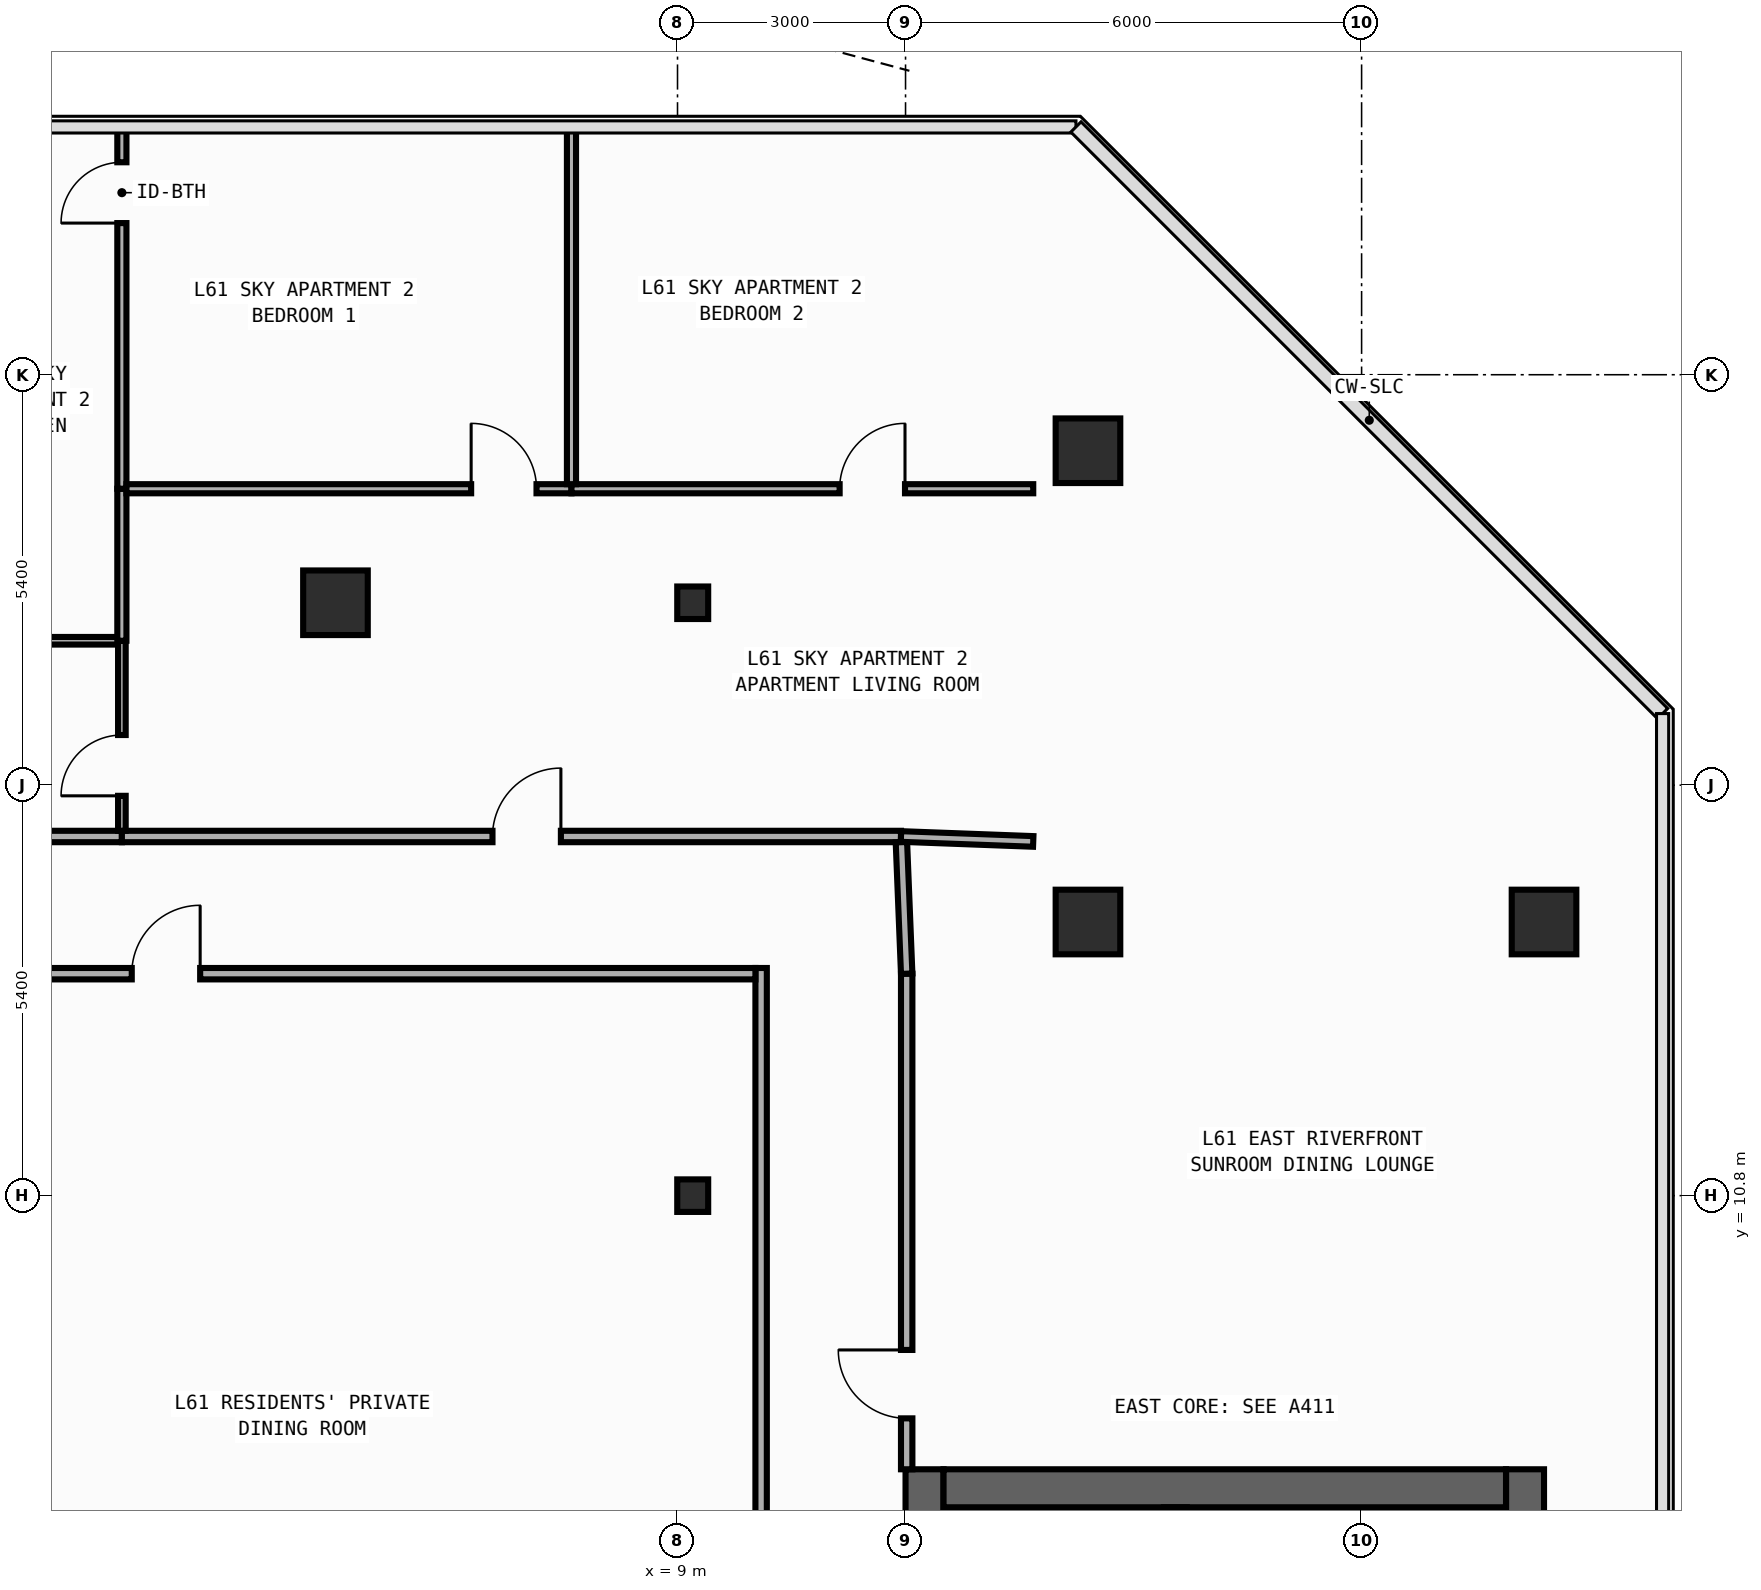
"""IFC4 building model, lengths in metres.
Left out: names, types, materials, properties, quantities, classifications, styles, units other than length and angle.
Written with IfcOpenShell. Run it as: python <this file> out.ifc"""

import sys

from ifc_helpers import new_model, si_unit, direction, frame, frame_2d, origin, origin_2d, place, context, subcontext, project, spatial, rectangle, i_section, extrude, element, fill, save


model = new_model("IFC4")
c1 = context("Model", 3, precision=1e-05, world=origin(), true_north=direction((0.0, 1.0)))
c2 = subcontext(c1, "Body", "Model", "MODEL_VIEW")
j1 = project(units=[si_unit("LENGTHUNIT", "METRE"), si_unit("PLANEANGLEUNIT", "RADIAN")], contexts=[c1])
p1 = place(None, origin())
s1 = spatial("IfcSite", under=j1, at=p1, CompositionType="ELEMENT")
p2 = place(p1, origin())
s2 = spatial("IfcBuilding", under=s1, at=p2, CompositionType="ELEMENT")
p3 = place(p2, frame((0.0, 0.0, 258.4)))
s3 = spatial("IfcBuildingStorey", under=s2, at=p3, CompositionType="ELEMENT", Elevation=258.4)
p4 = place(p3, frame((12.25, -19.8, 0.0), z_axis=(0.0, 0.0, 1.0), x_axis=(0.0, 1.0, 0.0)))
e1 = element("IfcWall", 1, at=p4, inside=s3, PredefinedType="SHEAR", context=c2, shape_type="SweptSolid", body=[
    extrude(rectangle(XDim=27.0, YDim=0.5, at=frame_2d((13.5, 0.0))), origin(), (0.0, 0.0, 1.0), 3.34),
])
p5 = place(p4, frame((23.05, 0.0, 0.0)))
e2 = element("IfcOpeningElement", 2, at=p5, cuts=e1, PredefinedType="OPENING", context=c2, shape_type="SweptSolid", body=[
    extrude(rectangle(XDim=1.1, YDim=2.2, at=frame_2d((0.55, 1.1))), frame((0.0, 0.26, 0.0), z_axis=(0.0, -1.0, 0.0), x_axis=(1.0, 0.0, 0.0)), (0.0, 0.0, 1.0), 0.52),
])
p6 = place(p4, frame((19.85, 0.0, 0.0)))
e3 = element("IfcOpeningElement", 3, at=p6, cuts=e1, PredefinedType="OPENING", context=c2, shape_type="SweptSolid", body=[
    extrude(rectangle(XDim=1.1, YDim=2.2, at=frame_2d((0.55, 1.1))), frame((0.0, 0.26, 0.0), z_axis=(0.0, -1.0, 0.0), x_axis=(1.0, 0.0, 0.0)), (0.0, 0.0, 1.0), 0.52),
])
p7 = place(p4, frame((16.65, 0.0, 0.0)))
e4 = element("IfcOpeningElement", 4, at=p7, cuts=e1, PredefinedType="OPENING", context=c2, shape_type="SweptSolid", body=[
    extrude(rectangle(XDim=1.1, YDim=2.2, at=frame_2d((0.55, 1.1))), frame((0.0, 0.26, 0.0), z_axis=(0.0, -1.0, 0.0), x_axis=(1.0, 0.0, 0.0)), (0.0, 0.0, 1.0), 0.52),
])
p8 = place(p4, frame((10.175, 0.0, 0.0)))
e5 = element("IfcOpeningElement", 5, at=p8, cuts=e1, PredefinedType="OPENING", context=c2, shape_type="SweptSolid", body=[
    extrude(rectangle(XDim=0.85, YDim=2.1, at=frame_2d((0.425, 1.05))), frame((0.0, 0.26, 0.0), z_axis=(0.0, -1.0, 0.0), x_axis=(1.0, 0.0, 0.0)), (0.0, 0.0, 1.0), 0.52),
])
p9 = place(p4, frame((12.725, 0.0, 0.0)))
e6 = element("IfcOpeningElement", 6, at=p9, cuts=e1, PredefinedType="OPENING", context=c2, shape_type="SweptSolid", body=[
    extrude(rectangle(XDim=1.15, YDim=2.2, at=frame_2d((0.575, 1.1))), frame((0.0, 0.26, 0.0), z_axis=(0.0, -1.0, 0.0), x_axis=(1.0, 0.0, 0.0)), (0.0, 0.0, 1.0), 0.52),
])
p10 = place(p4, frame((25.125, 0.0, 0.0)))
e7 = element("IfcOpeningElement", 7, at=p10, cuts=e1, PredefinedType="OPENING", context=c2, shape_type="SweptSolid", body=[
    extrude(rectangle(XDim=0.85, YDim=2.1, at=frame_2d((0.425, 1.05))), frame((0.0, 0.26, 0.0), z_axis=(0.0, -1.0, 0.0), x_axis=(1.0, 0.0, 0.0)), (0.0, 0.0, 1.0), 0.52),
])
p11 = place(p3, frame((20.15, -19.8, 0.0), z_axis=(0.0, 0.0, 1.0), x_axis=(0.0, 1.0, 0.0)))
e8 = element("IfcWall", 8, at=p11, inside=s3, PredefinedType="SHEAR", context=c2, shape_type="SweptSolid", body=[
    extrude(rectangle(XDim=27.0, YDim=0.5, at=frame_2d((13.5, 0.0))), origin(), (0.0, 0.0, 1.0), 3.34),
])
p12 = place(p3, frame((12.5, 6.95, 0.0), z_axis=(0.0, 0.0, 1.0), x_axis=(1.0, 0.0, 0.0)))
e9 = element("IfcWall", 9, at=p12, inside=s3, PredefinedType="SHEAR", context=c2, shape_type="SweptSolid", body=[
    extrude(rectangle(XDim=7.4, YDim=0.5, at=frame_2d((3.7, 0.0))), origin(), (0.0, 0.0, 1.0), 3.34),
])
p13 = place(p3, frame((15.55, -19.3, 0.0), z_axis=(0.0, 0.0, 1.0), x_axis=(0.0, 1.0, 0.0)))
e10 = element("IfcWall", 10, at=p13, inside=s3, PredefinedType="SHEAR", context=c2, shape_type="SweptSolid", body=[
    extrude(rectangle(XDim=26.0, YDim=0.3, at=frame_2d((13.0, 0.0))), origin(), (0.0, 0.0, 1.0), 3.34),
])
p14 = place(p13, frame((12.225, 0.0, 0.0)))
e11 = element("IfcOpeningElement", 11, at=p14, cuts=e10, PredefinedType="OPENING", context=c2, shape_type="SweptSolid", body=[
    extrude(rectangle(XDim=1.15, YDim=2.2, at=frame_2d((0.575, 1.1))), frame((0.0, 0.16, 0.0), z_axis=(0.0, -1.0, 0.0), x_axis=(1.0, 0.0, 0.0)), (0.0, 0.0, 1.0), 0.32),
])
p15 = place(p13, frame((24.625, 0.0, 0.0)))
e12 = element("IfcOpeningElement", 12, at=p15, cuts=e10, PredefinedType="OPENING", context=c2, shape_type="SweptSolid", body=[
    extrude(rectangle(XDim=0.85, YDim=2.1, at=frame_2d((0.425, 1.05))), frame((0.0, 0.16, 0.0), z_axis=(0.0, -1.0, 0.0), x_axis=(1.0, 0.0, 0.0)), (0.0, 0.0, 1.0), 0.32),
])
for number, where, z_axis, x_axis in (
    (13, (9.2, 10.8, 0.0), (0.0, 0.0, 1.0), (1.0, 0.0, 0.0)),
    (14, (9.2, 18.6, 0.0), (0.0, 0.0, 1.0), (1.0, 0.0, 0.0)),
):
    element("IfcColumn", number, at=place(p3, frame(where, z_axis=z_axis, x_axis=x_axis)), inside=s3, PredefinedType="COLUMN", context=c2, shape_type="SweptSolid", body=[
        extrude(i_section(OverallWidth=0.407, OverallDepth=0.428, WebThickness=0.02, FlangeThickness=0.035, FilletRadius=0.022, at=origin_2d()), origin(), (0.0, 0.0, 1.0), 3.6),
    ])
for number, where, z_axis, x_axis in (
    (15, (20.4, 14.4, 0.0), (0.0, 0.0, 1.0), (1.0, 0.0, 0.0)),
    (16, (14.4, 14.4, 0.0), (0.0, 0.0, 1.0), (1.0, 0.0, 0.0)),
    (17, (4.5, 18.6, 0.0), (0.0, 0.0, 1.0), (1.0, 0.0, 0.0)),
    (18, (14.4, 20.6, 0.0), (0.0, 0.0, 1.0), (1.0, 0.0, 0.0)),
):
    element("IfcColumn", number, at=place(p3, frame(where, z_axis=z_axis, x_axis=x_axis)), inside=s3, PredefinedType="COLUMN", context=c2, shape_type="SweptSolid", body=[
        extrude(rectangle(XDim=0.85, YDim=0.85, at=origin_2d()), origin(), (0.0, 0.0, 1.0), 3.6),
    ])
p16 = place(p3, frame((12.015, 7.2, 0.0), z_axis=(0.0, 0.0, 1.0), x_axis=(0.0, 1.0, 0.0)))
e19 = element("IfcWall", 19, at=p16, inside=s3, PredefinedType="PARTITIONING", context=c2, shape_type="SweptSolid", body=[
    extrude(rectangle(XDim=6.52, YDim=0.15, at=frame_2d((3.26, 0.0))), origin(), (0.0, 0.0, 1.0), 3.34),
])
p17 = place(p16, frame((0.67, 0.0, 0.0)))
e20 = element("IfcOpeningElement", 20, at=p17, cuts=e19, PredefinedType="OPENING", context=c2, shape_type="SweptSolid", body=[
    extrude(rectangle(XDim=0.9, YDim=2.15, at=frame_2d((0.45, 1.075))), frame((0.0, 0.085, 0.0), z_axis=(0.0, -1.0, 0.0), x_axis=(1.0, 0.0, 0.0)), (0.0, 0.0, 1.0), 0.17),
])
p18 = place(p3, frame((10.1, -1.61, 0.0), z_axis=(0.0, 0.0, 1.0), x_axis=(0.0, 1.0, 0.0)))
e21 = element("IfcWall", 21, at=p18, inside=s3, PredefinedType="PARTITIONING", context=c2, shape_type="SweptSolid", body=[
    extrude(rectangle(XDim=15.405, YDim=0.15, at=frame_2d((7.703, 0.0))), origin(), (0.0, 0.0, 1.0), 3.34),
])
p19 = place(p18, frame((6.543, 0.0, 0.0)))
e22 = element("IfcOpeningElement", 22, at=p19, cuts=e21, PredefinedType="OPENING", context=c2, shape_type="SweptSolid", body=[
    extrude(rectangle(XDim=0.9, YDim=2.15, at=frame_2d((0.45, 1.075))), frame((0.0, 0.085, 0.0), z_axis=(0.0, -1.0, 0.0), x_axis=(1.0, 0.0, 0.0)), (0.0, 0.0, 1.0), 0.17),
])
p20 = place(p3, frame((-0.9, 15.525, 0.0), z_axis=(0.0, 0.0, 1.0), x_axis=(1.0, 0.0, 0.0)))
e23 = element("IfcWall", 23, at=p20, inside=s3, PredefinedType="PARTITIONING", context=c2, shape_type="SweptSolid", body=[
    extrude(rectangle(XDim=2.59, YDim=0.15, at=frame_2d((1.295, 0.0))), origin(), (0.0, 0.0, 1.0), 3.34),
])
p21 = place(p3, frame((1.69, 15.525, 0.0), z_axis=(0.0, 0.0, 1.0), x_axis=(1.0, 0.0, 0.0)))
e24 = element("IfcWall", 24, at=p21, inside=s3, PredefinedType="PARTITIONING", context=c2, shape_type="SweptSolid", body=[
    extrude(rectangle(XDim=10.25, YDim=0.15, at=frame_2d((5.125, 0.0))), origin(), (0.0, 0.0, 1.0), 3.34),
])
p22 = place(p21, frame((4.876, 0.0, 0.0)))
e25 = element("IfcOpeningElement", 25, at=p22, cuts=e24, PredefinedType="OPENING", context=c2, shape_type="SweptSolid", body=[
    extrude(rectangle(XDim=0.9, YDim=2.15, at=frame_2d((0.45, 1.075))), frame((0.0, 0.085, 0.0), z_axis=(0.0, -1.0, 0.0), x_axis=(1.0, 0.0, 0.0)), (0.0, 0.0, 1.0), 0.17),
])
p23 = place(p3, frame((12.015, 13.72, 0.0), z_axis=(0.0, 0.0, 1.0), x_axis=(-0.040046877756, 0.99919780203, 0.0)))
e26 = element("IfcWall", 26, at=p23, inside=s3, PredefinedType="PARTITIONING", context=c2, shape_type="SweptSolid", body=[
    extrude(rectangle(XDim=1.731, YDim=0.15, at=frame_2d((0.866, 0.0))), origin(), (0.0, 0.0, 1.0), 3.34),
])
p24 = place(p3, frame((-1.66, 13.72, 0.0), z_axis=(0.0, 0.0, 1.0), x_axis=(1.0, 0.0, 0.0)))
e27 = element("IfcWall", 27, at=p24, inside=s3, PredefinedType="PARTITIONING", context=c2, shape_type="SweptSolid", body=[
    extrude(rectangle(XDim=11.685, YDim=0.15, at=frame_2d((5.842, 0.0))), origin(), (0.0, 0.0, 1.0), 3.34),
])
p25 = place(p24, frame((3.48, 0.0, 0.0)))
e28 = element("IfcOpeningElement", 28, at=p25, cuts=e27, PredefinedType="OPENING", context=c2, shape_type="SweptSolid", body=[
    extrude(rectangle(XDim=0.9, YDim=2.15, at=frame_2d((0.45, 1.075))), frame((0.0, 0.085, 0.0), z_axis=(0.0, -1.0, 0.0), x_axis=(1.0, 0.0, 0.0)), (0.0, 0.0, 1.0), 0.17),
])
p26 = place(p3, frame((-0.83, 18.1, 0.0), z_axis=(0.0, 0.0, 1.0), x_axis=(1.0, 0.0, 0.0)))
e29 = element("IfcWall", 29, at=p26, inside=s3, PredefinedType="PARTITIONING", context=c2, shape_type="SweptSolid", body=[
    extrude(rectangle(XDim=2.47, YDim=0.1, at=frame_2d((1.235, 0.0))), origin(), (0.0, 0.0, 1.0), 3.34),
])
p27 = place(p3, frame((1.69, 15.6, 0.0), z_axis=(0.0, 0.0, 1.0), x_axis=(0.0, 1.0, 0.0)))
e30 = element("IfcWall", 30, at=p27, inside=s3, PredefinedType="PARTITIONING", context=c2, shape_type="SweptSolid", body=[
    extrude(rectangle(XDim=2.5, YDim=0.1, at=frame_2d((1.25, 0.0))), origin(), (0.0, 0.0, 1.0), 3.34),
])
p28 = place(p27, frame((0.46, 0.0, 0.0)))
e31 = element("IfcOpeningElement", 31, at=p28, cuts=e30, PredefinedType="OPENING", context=c2, shape_type="SweptSolid", body=[
    extrude(rectangle(XDim=0.8, YDim=2.1, at=frame_2d((0.4, 1.05))), frame((0.0, 0.06, 0.0), z_axis=(0.0, -1.0, 0.0), x_axis=(1.0, 0.0, 0.0)), (0.0, 0.0, 1.0), 0.12),
])
p29 = place(p3, frame((1.69, 18.1, 0.0), z_axis=(0.0, 0.0, 1.0), x_axis=(0.0, 1.0, 0.0)))
e32 = element("IfcWall", 32, at=p29, inside=s3, PredefinedType="PARTITIONING", context=c2, shape_type="SweptSolid", body=[
    extrude(rectangle(XDim=2.0, YDim=0.12, at=frame_2d((1.0, 0.0))), origin(), (0.0, 0.0, 1.0), 3.34),
])
p30 = place(p3, frame((1.69, 20.1, 0.0), z_axis=(0.0, 0.0, 1.0), x_axis=(0.0, 1.0, 0.0)))
e33 = element("IfcWall", 33, at=p30, inside=s3, PredefinedType="PARTITIONING", context=c2, shape_type="SweptSolid", body=[
    extrude(rectangle(XDim=4.755, YDim=0.12, at=frame_2d((2.377, 0.0))), origin(), (0.0, 0.0, 1.0), 3.34),
])
p31 = place(p30, frame((3.495, 0.0, 0.0)))
e34 = element("IfcOpeningElement", 34, at=p31, cuts=e33, PredefinedType="OPENING", context=c2, shape_type="SweptSolid", body=[
    extrude(rectangle(XDim=0.8, YDim=2.1, at=frame_2d((0.4, 1.05))), frame((0.0, 0.07, 0.0), z_axis=(0.0, -1.0, 0.0), x_axis=(1.0, 0.0, 0.0)), (0.0, 0.0, 1.0), 0.14),
])
p32 = place(p3, frame((1.75, 20.1, 0.0), z_axis=(0.0, 0.0, 1.0), x_axis=(1.0, 0.0, 0.0)))
e35 = element("IfcWall", 35, at=p32, inside=s3, PredefinedType="PARTITIONING", context=c2, shape_type="SweptSolid", body=[
    extrude(rectangle(XDim=5.855, YDim=0.12, at=frame_2d((2.927, 0.0))), origin(), (0.0, 0.0, 1.0), 3.34),
])
p33 = place(p32, frame((4.535, 0.0, 0.0)))
e36 = element("IfcOpeningElement", 36, at=p33, cuts=e35, PredefinedType="OPENING", context=c2, shape_type="SweptSolid", body=[
    extrude(rectangle(XDim=0.86, YDim=2.15, at=frame_2d((0.43, 1.075))), frame((0.0, 0.07, 0.0), z_axis=(0.0, -1.0, 0.0), x_axis=(1.0, 0.0, 0.0)), (0.0, 0.0, 1.0), 0.14),
])
p34 = place(p3, frame((7.605, 20.1, 0.0), z_axis=(0.0, 0.0, 1.0), x_axis=(1.0, 0.0, 0.0)))
e37 = element("IfcWall", 37, at=p34, inside=s3, PredefinedType="PARTITIONING", context=c2, shape_type="SweptSolid", body=[
    extrude(rectangle(XDim=6.075, YDim=0.12, at=frame_2d((3.038, 0.0))), origin(), (0.0, 0.0, 1.0), 3.34),
])
p35 = place(p34, frame((3.528, 0.0, 0.0)))
e38 = element("IfcOpeningElement", 38, at=p35, cuts=e37, PredefinedType="OPENING", context=c2, shape_type="SweptSolid", body=[
    extrude(rectangle(XDim=0.86, YDim=2.15, at=frame_2d((0.43, 1.075))), frame((0.0, 0.07, 0.0), z_axis=(0.0, -1.0, 0.0), x_axis=(1.0, 0.0, 0.0)), (0.0, 0.0, 1.0), 0.14),
])
p36 = place(p3, frame((11.94, 15.525, 0.0), z_axis=(0.0, 0.0, 1.0), x_axis=(0.999304229002, -0.037296888581, 0.0)))
e39 = element("IfcWall", 39, at=p36, inside=s3, PredefinedType="PARTITIONING", context=c2, shape_type="SweptSolid", body=[
    extrude(rectangle(XDim=1.741, YDim=0.14, at=frame_2d((0.871, 0.0))), origin(), (0.0, 0.0, 1.0), 3.34),
])
p37 = place(p3, frame((7.605, 20.16, 0.0), z_axis=(0.0, 0.0, 1.0), x_axis=(0.0, 1.0, 0.0)))
e40 = element("IfcWall", 40, at=p37, inside=s3, PredefinedType="PARTITIONING", context=c2, shape_type="SweptSolid", body=[
    extrude(rectangle(XDim=4.695, YDim=0.12, at=frame_2d((2.348, 0.0))), origin(), (0.0, 0.0, 1.0), 3.34),
])
p38 = place(p17, origin())
e41 = element("IfcDoor", 41, at=p38, inside=s3, OperationType="SINGLE_SWING_RIGHT", PredefinedType="DOOR", context=c2, shape_type="SweptSolid", body=[
    extrude(rectangle(XDim=0.9, YDim=2.15, at=frame_2d((0.45, 1.075))), frame((0.0, 0.025, 0.0), z_axis=(0.0, -1.0, 0.0), x_axis=(1.0, 0.0, 0.0)), (0.0, 0.0, 1.0), 0.05),
])
fill(e20, e41)
p39 = place(p22, origin())
e42 = element("IfcDoor", 42, at=p39, inside=s3, OperationType="SINGLE_SWING_RIGHT", PredefinedType="DOOR", context=c2, shape_type="SweptSolid", body=[
    extrude(rectangle(XDim=0.9, YDim=2.15, at=frame_2d((0.45, 1.075))), frame((0.0, 0.025, 0.0), z_axis=(0.0, -1.0, 0.0), x_axis=(1.0, 0.0, 0.0)), (0.0, 0.0, 1.0), 0.05),
])
fill(e25, e42)
p40 = place(p25, origin())
e43 = element("IfcDoor", 43, at=p40, inside=s3, OperationType="SINGLE_SWING_RIGHT", PredefinedType="DOOR", context=c2, shape_type="SweptSolid", body=[
    extrude(rectangle(XDim=0.9, YDim=2.15, at=frame_2d((0.45, 1.075))), frame((0.0, 0.025, 0.0), z_axis=(0.0, -1.0, 0.0), x_axis=(1.0, 0.0, 0.0)), (0.0, 0.0, 1.0), 0.05),
])
fill(e28, e43)
p41 = place(p28, origin())
e44 = element("IfcDoor", 44, at=p41, inside=s3, OperationType="SINGLE_SWING_LEFT", PredefinedType="DOOR", context=c2, shape_type="SweptSolid", body=[
    extrude(rectangle(XDim=0.8, YDim=2.1, at=frame_2d((0.4, 1.05))), frame((0.0, 0.025, 0.0), z_axis=(0.0, -1.0, 0.0), x_axis=(1.0, 0.0, 0.0)), (0.0, 0.0, 1.0), 0.05),
])
fill(e31, e44)
p42 = place(p33, origin())
e45 = element("IfcDoor", 45, at=p42, inside=s3, OperationType="SINGLE_SWING_LEFT", PredefinedType="DOOR", context=c2, shape_type="SweptSolid", body=[
    extrude(rectangle(XDim=0.86, YDim=2.15, at=frame_2d((0.43, 1.075))), frame((0.0, 0.025, 0.0), z_axis=(0.0, -1.0, 0.0), x_axis=(1.0, 0.0, 0.0)), (0.0, 0.0, 1.0), 0.05),
])
fill(e36, e45)
p43 = place(p35, origin())
e46 = element("IfcDoor", 46, at=p43, inside=s3, OperationType="SINGLE_SWING_RIGHT", PredefinedType="DOOR", context=c2, shape_type="SweptSolid", body=[
    extrude(rectangle(XDim=0.86, YDim=2.15, at=frame_2d((0.43, 1.075))), frame((0.0, 0.025, 0.0), z_axis=(0.0, -1.0, 0.0), x_axis=(1.0, 0.0, 0.0)), (0.0, 0.0, 1.0), 0.05),
])
fill(e38, e46)
p44 = place(p31, origin())
e47 = element("IfcDoor", 47, at=p44, inside=s3, OperationType="SINGLE_SWING_LEFT", PredefinedType="DOOR", context=c2, shape_type="SweptSolid", body=[
    extrude(rectangle(XDim=0.8, YDim=2.1, at=frame_2d((0.4, 1.05))), frame((0.0, 0.025, 0.0), z_axis=(0.0, -1.0, 0.0), x_axis=(1.0, 0.0, 0.0)), (0.0, 0.0, 1.0), 0.05),
])
fill(e34, e47)
save(model, sys.argv[1])
